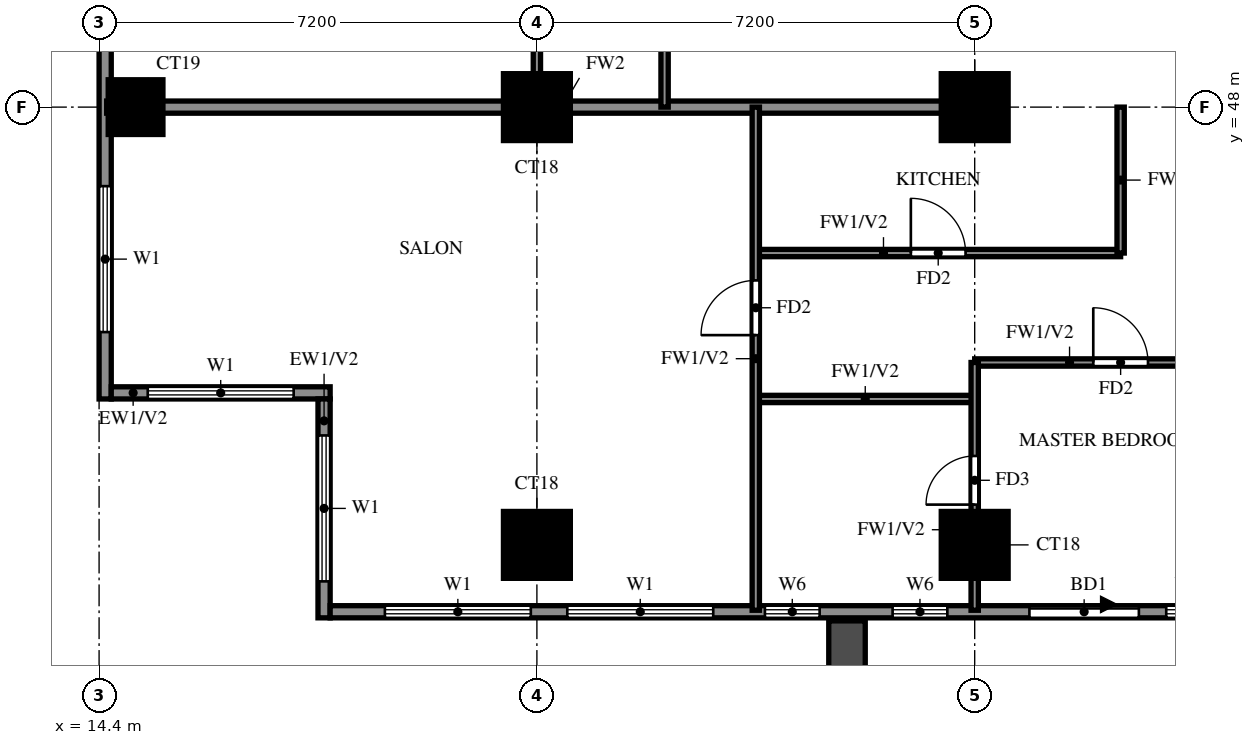
"""IFC4 building model, lengths in metres.
Left out: names, types, materials, properties, quantities, classifications, styles, units other than length and angle.
Written with IfcOpenShell. Run it as: python <this file> out.ifc"""

import sys

from ifc_helpers import new_model, si_unit, direction, frame, frame_2d, origin, origin_2d, place, context, subcontext, project, spatial, rectangle, extrude, source, transform, mapped, element, fill, save


model = new_model("IFC4")
c1 = context("Model", 3, precision=1e-05, world=origin(), true_north=direction((0.0, 1.0)))
c2 = subcontext(c1, "Body", "Model", "MODEL_VIEW")
j1 = project(units=[si_unit("LENGTHUNIT", "METRE"), si_unit("PLANEANGLEUNIT", "RADIAN")], contexts=[c1])
p1 = place(None, origin())
s1 = spatial("IfcSite", under=j1, at=p1, CompositionType="ELEMENT")
p2 = place(p1, origin())
s2 = spatial("IfcBuilding", under=s1, at=p2, CompositionType="ELEMENT")
p3 = place(p2, frame((0.0, 0.0, 123.5)))
s3 = spatial("IfcBuildingStorey", under=s2, at=p3, CompositionType="ELEMENT", Elevation=123.5)
m1 = source(origin(), c2, "Body", "SweptSolid", [
    extrude(rectangle(XDim=1.1, YDim=1.1, at=origin_2d()), origin(), (0.0, 0.0, 1.0), 3.2),
])
for number, where, z_axis, x_axis in (
    (1, (21.6, 40.8, 0.0), (0.0, 0.0, 1.0), (1.0, 0.0, 0.0)),
    (2, (28.8, 40.8, 0.0), (0.0, 0.0, 1.0), (1.0, 0.0, 0.0)),
):
    element("IfcColumn", number, at=place(p3, frame(where, z_axis=z_axis, x_axis=x_axis)), inside=s3, PredefinedType="COLUMN", context=c2, shape_type="MappedRepresentation", body=[
        mapped(m1, transform((0.0, 0.0, 0.0))),
    ])
m2 = source(origin(), c2, "Body", "SweptSolid", [
    extrude(rectangle(XDim=0.9, YDim=0.9, at=origin_2d()), origin(), (0.0, 0.0, 1.0), 3.2),
])
p4 = place(p3, frame((15.0, 48.0, 0.0), z_axis=(0.0, 0.0, 1.0), x_axis=(1.0, 0.0, 0.0)))
e3 = element("IfcColumn", 3, at=p4, inside=s3, PredefinedType="COLUMN", context=c2, shape_type="MappedRepresentation", body=[
    mapped(m2, transform((0.0, 0.0, 0.0))),
])
for number, where, z_axis, x_axis in (
    (4, (21.6, 48.0, 0.0), (0.0, 0.0, 1.0), (1.0, 0.0, 0.0)),
    (5, (28.8, 48.0, 0.0), (0.0, 0.0, 1.0), (1.0, 0.0, 0.0)),
):
    element("IfcColumn", number, at=place(p3, frame(where, z_axis=z_axis, x_axis=x_axis)), inside=s3, PredefinedType="COLUMN", context=c2, shape_type="MappedRepresentation", body=[
        mapped(m1, transform((0.0, 0.0, 0.0))),
    ])
p5 = place(p3, frame((14.5, 76.6, 0.0), z_axis=(0.0, 0.0, 1.0), x_axis=(0.0, -1.0, 0.0)))
e6 = element("IfcWall", 6, at=p5, inside=s3, PredefinedType="SOLIDWALL", context=c2, shape_type="SweptSolid", body=[
    extrude(rectangle(XDim=33.4, YDim=0.2, at=frame_2d((16.7, 0.0))), origin(), (0.0, 0.0, 1.0), 3.2),
])
p6 = place(p5, frame((4.3, 0.0, 0.0)))
e7 = element("IfcOpeningElement", 7, at=p6, cuts=e6, PredefinedType="OPENING", context=c2, shape_type="SweptSolid", body=[
    extrude(rectangle(XDim=1.8, YDim=2.4, at=frame_2d((0.9, 1.2))), frame((0.0, 0.11, 0.0), z_axis=(0.0, -1.0, 0.0), x_axis=(1.0, 0.0, 0.0)), (0.0, 0.0, 1.0), 0.22),
])
p7 = place(p5, frame((18.7, 0.0, 0.0)))
e8 = element("IfcOpeningElement", 8, at=p7, cuts=e6, PredefinedType="OPENING", context=c2, shape_type="SweptSolid", body=[
    extrude(rectangle(XDim=1.8, YDim=2.4, at=frame_2d((0.9, 1.2))), frame((0.0, 0.11, 0.0), z_axis=(0.0, -1.0, 0.0), x_axis=(1.0, 0.0, 0.0)), (0.0, 0.0, 1.0), 0.22),
])
p8 = place(p5, frame((29.9, 0.0, 0.6)))
e9 = element("IfcOpeningElement", 9, at=p8, cuts=e6, PredefinedType="OPENING", context=c2, shape_type="SweptSolid", body=[
    extrude(rectangle(XDim=2.4, YDim=2.4, at=frame_2d((1.2, 1.2))), frame((0.0, 0.11, 0.0), z_axis=(0.0, -1.0, 0.0), x_axis=(1.0, 0.0, 0.0)), (0.0, 0.0, 1.0), 0.22),
])
p9 = place(p5, frame((22.05, 0.0, 0.6)))
e10 = element("IfcOpeningElement", 10, at=p9, cuts=e6, PredefinedType="OPENING", context=c2, shape_type="SweptSolid", body=[
    extrude(rectangle(XDim=0.9, YDim=2.4, at=frame_2d((0.45, 1.2))), frame((0.0, 0.11, 0.0), z_axis=(0.0, -1.0, 0.0), x_axis=(1.0, 0.0, 0.0)), (0.0, 0.0, 1.0), 0.22),
])
p10 = place(p5, frame((24.8, 0.0, 0.6)))
e11 = element("IfcOpeningElement", 11, at=p10, cuts=e6, PredefinedType="OPENING", context=c2, shape_type="SweptSolid", body=[
    extrude(rectangle(XDim=2.4, YDim=2.4, at=frame_2d((1.2, 1.2))), frame((0.0, 0.11, 0.0), z_axis=(0.0, -1.0, 0.0), x_axis=(1.0, 0.0, 0.0)), (0.0, 0.0, 1.0), 0.22),
])
p11 = place(p5, frame((15.0, 0.0, 0.6)))
e12 = element("IfcOpeningElement", 12, at=p11, cuts=e6, PredefinedType="OPENING", context=c2, shape_type="SweptSolid", body=[
    extrude(rectangle(XDim=1.2, YDim=2.4, at=frame_2d((0.6, 1.2))), frame((0.0, 0.11, 0.0), z_axis=(0.0, -1.0, 0.0), x_axis=(1.0, 0.0, 0.0)), (0.0, 0.0, 1.0), 0.22),
])
p12 = place(p5, frame((11.75, 0.0, 1.5)))
e13 = element("IfcOpeningElement", 13, at=p12, cuts=e6, PredefinedType="OPENING", context=c2, shape_type="SweptSolid", body=[
    extrude(rectangle(XDim=0.9, YDim=0.9, at=frame_2d((0.45, 0.45))), frame((0.0, 0.11, 0.0), z_axis=(0.0, -1.0, 0.0), x_axis=(1.0, 0.0, 0.0)), (0.0, 0.0, 1.0), 0.22),
])
p13 = place(p5, frame((7.5, 0.0, 0.6)))
e14 = element("IfcOpeningElement", 14, at=p13, cuts=e6, PredefinedType="OPENING", context=c2, shape_type="SweptSolid", body=[
    extrude(rectangle(XDim=1.2, YDim=2.4, at=frame_2d((0.6, 1.2))), frame((0.0, 0.11, 0.0), z_axis=(0.0, -1.0, 0.0), x_axis=(1.0, 0.0, 0.0)), (0.0, 0.0, 1.0), 0.22),
])
p14 = place(p5, frame((9.55, 0.0, 0.6)))
e15 = element("IfcOpeningElement", 15, at=p14, cuts=e6, PredefinedType="OPENING", context=c2, shape_type="SweptSolid", body=[
    extrude(rectangle(XDim=0.9, YDim=2.4, at=frame_2d((0.45, 1.2))), frame((0.0, 0.11, 0.0), z_axis=(0.0, -1.0, 0.0), x_axis=(1.0, 0.0, 0.0)), (0.0, 0.0, 1.0), 0.22),
])
p15 = place(p5, frame((0.6, 0.0, 0.6)))
e16 = element("IfcOpeningElement", 16, at=p15, cuts=e6, PredefinedType="OPENING", context=c2, shape_type="SweptSolid", body=[
    extrude(rectangle(XDim=1.2, YDim=2.4, at=frame_2d((0.6, 1.2))), frame((0.0, 0.11, 0.0), z_axis=(0.0, -1.0, 0.0), x_axis=(1.0, 0.0, 0.0)), (0.0, 0.0, 1.0), 0.22),
])
p16 = place(p3, frame((14.6, 43.3, 0.0), z_axis=(0.0, 0.0, 1.0), x_axis=(1.0, 0.0, 0.0)))
e17 = element("IfcWall", 17, at=p16, inside=s3, PredefinedType="SOLIDWALL", context=c2, shape_type="SweptSolid", body=[
    extrude(rectangle(XDim=3.6, YDim=0.2, at=frame_2d((1.8, 0.0))), origin(), (0.0, 0.0, 1.0), 3.2),
])
p17 = place(p16, frame((0.6, 0.0, 0.6)))
e18 = element("IfcOpeningElement", 18, at=p17, cuts=e17, PredefinedType="OPENING", context=c2, shape_type="SweptSolid", body=[
    extrude(rectangle(XDim=2.4, YDim=2.4, at=frame_2d((1.2, 1.2))), frame((0.0, 0.11, 0.0), z_axis=(0.0, -1.0, 0.0), x_axis=(1.0, 0.0, 0.0)), (0.0, 0.0, 1.0), 0.22),
])
p18 = place(p3, frame((18.1, 43.2, 0.0), z_axis=(0.0, 0.0, 1.0), x_axis=(0.0, -1.0, 0.0)))
e19 = element("IfcWall", 19, at=p18, inside=s3, PredefinedType="SOLIDWALL", context=c2, shape_type="SweptSolid", body=[
    extrude(rectangle(XDim=3.6, YDim=0.2, at=frame_2d((1.8, 0.0))), origin(), (0.0, 0.0, 1.0), 3.2),
])
p19 = place(p18, frame((0.6, 0.0, 0.6)))
e20 = element("IfcOpeningElement", 20, at=p19, cuts=e19, PredefinedType="OPENING", context=c2, shape_type="SweptSolid", body=[
    extrude(rectangle(XDim=2.4, YDim=2.4, at=frame_2d((1.2, 1.2))), frame((0.0, 0.11, 0.0), z_axis=(0.0, -1.0, 0.0), x_axis=(1.0, 0.0, 0.0)), (0.0, 0.0, 1.0), 0.22),
])
p20 = place(p3, frame((18.2, 39.7, 0.0), z_axis=(0.0, 0.0, 1.0), x_axis=(1.0, 0.0, 0.0)))
e21 = element("IfcWall", 21, at=p20, inside=s3, PredefinedType="SOLIDWALL", context=c2, shape_type="SweptSolid", body=[
    extrude(rectangle(XDim=23.8, YDim=0.2, at=frame_2d((11.9, 0.0))), origin(), (0.0, 0.0, 1.0), 3.2),
])
p21 = place(p20, frame((11.5, 0.0, 0.0)))
e22 = element("IfcOpeningElement", 22, at=p21, cuts=e21, PredefinedType="OPENING", context=c2, shape_type="SweptSolid", body=[
    extrude(rectangle(XDim=1.8, YDim=2.4, at=frame_2d((0.9, 1.2))), frame((0.0, 0.11, 0.0), z_axis=(0.0, -1.0, 0.0), x_axis=(1.0, 0.0, 0.0)), (0.0, 0.0, 1.0), 0.22),
])
p22 = place(p20, frame((0.9, 0.0, 0.6)))
e23 = element("IfcOpeningElement", 23, at=p22, cuts=e21, PredefinedType="OPENING", context=c2, shape_type="SweptSolid", body=[
    extrude(rectangle(XDim=2.4, YDim=2.4, at=frame_2d((1.2, 1.2))), frame((0.0, 0.11, 0.0), z_axis=(0.0, -1.0, 0.0), x_axis=(1.0, 0.0, 0.0)), (0.0, 0.0, 1.0), 0.22),
])
p23 = place(p20, frame((3.9, 0.0, 0.6)))
e24 = element("IfcOpeningElement", 24, at=p23, cuts=e21, PredefinedType="OPENING", context=c2, shape_type="SweptSolid", body=[
    extrude(rectangle(XDim=2.4, YDim=2.4, at=frame_2d((1.2, 1.2))), frame((0.0, 0.11, 0.0), z_axis=(0.0, -1.0, 0.0), x_axis=(1.0, 0.0, 0.0)), (0.0, 0.0, 1.0), 0.22),
])
p24 = place(p20, frame((13.75, 0.0, 0.6)))
e25 = element("IfcOpeningElement", 25, at=p24, cuts=e21, PredefinedType="OPENING", context=c2, shape_type="SweptSolid", body=[
    extrude(rectangle(XDim=0.9, YDim=2.4, at=frame_2d((0.45, 1.2))), frame((0.0, 0.11, 0.0), z_axis=(0.0, -1.0, 0.0), x_axis=(1.0, 0.0, 0.0)), (0.0, 0.0, 1.0), 0.22),
])
p25 = place(p20, frame((7.15, 0.0, 1.5)))
e26 = element("IfcOpeningElement", 26, at=p25, cuts=e21, PredefinedType="OPENING", context=c2, shape_type="SweptSolid", body=[
    extrude(rectangle(XDim=0.9, YDim=0.9, at=frame_2d((0.45, 0.45))), frame((0.0, 0.11, 0.0), z_axis=(0.0, -1.0, 0.0), x_axis=(1.0, 0.0, 0.0)), (0.0, 0.0, 1.0), 0.22),
])
p26 = place(p20, frame((9.25, 0.0, 1.5)))
e27 = element("IfcOpeningElement", 27, at=p26, cuts=e21, PredefinedType="OPENING", context=c2, shape_type="SweptSolid", body=[
    extrude(rectangle(XDim=0.9, YDim=0.9, at=frame_2d((0.45, 0.45))), frame((0.0, 0.11, 0.0), z_axis=(0.0, -1.0, 0.0), x_axis=(1.0, 0.0, 0.0)), (0.0, 0.0, 1.0), 0.22),
])
p27 = place(p3, frame((26.7, 39.55, 0.0), z_axis=(0.0, 0.0, 1.0), x_axis=(0.0, -1.0, 0.0)))
e28 = element("IfcWall", 28, at=p27, inside=s3, PredefinedType="SOLIDWALL", context=c2, shape_type="SweptSolid", body=[
    extrude(rectangle(XDim=2.65, YDim=0.6, at=frame_2d((1.325, 0.0))), origin(), (0.0, 0.0, 1.0), 2.85),
])
p28 = place(p3, frame((14.525, 48.0, 0.0), z_axis=(0.0, 0.0, 1.0), x_axis=(1.0, 0.0, 0.0)))
e29 = element("IfcWall", 29, at=p28, inside=s3, PredefinedType="SOLIDWALL", context=c2, shape_type="SweptSolid", body=[
    extrude(rectangle(XDim=14.275, YDim=0.2, at=frame_2d((7.138, 0.0))), origin(), (0.0, 0.0, 1.0), 3.2),
])
p29 = place(p3, frame((25.2, 43.2, 0.0), z_axis=(0.0, 0.0, 1.0), x_axis=(1.0, 0.0, 0.0)))
e30 = element("IfcWall", 30, at=p29, inside=s3, PredefinedType="PARTITIONING", context=c2, shape_type="SweptSolid", body=[
    extrude(rectangle(XDim=3.6, YDim=0.12, at=frame_2d((1.8, 0.0))), origin(), (0.0, 0.0, 1.0), 3.2),
])
p30 = place(p3, frame((28.8, 43.8, 0.0), z_axis=(0.0, 0.0, 1.0), x_axis=(1.0, 0.0, 0.0)))
e31 = element("IfcWall", 31, at=p30, inside=s3, PredefinedType="PARTITIONING", context=c2, shape_type="SweptSolid", body=[
    extrude(rectangle(XDim=4.8, YDim=0.12, at=frame_2d((2.4, 0.0))), origin(), (0.0, 0.0, 1.0), 3.2),
])
p31 = place(p30, frame((1.95, 0.0, 0.0)))
e32 = element("IfcOpeningElement", 32, at=p31, cuts=e31, PredefinedType="OPENING", context=c2, shape_type="SweptSolid", body=[
    extrude(rectangle(XDim=0.9, YDim=2.1, at=frame_2d((0.45, 1.05))), frame((0.0, 0.07, 0.0), z_axis=(0.0, -1.0, 0.0), x_axis=(1.0, 0.0, 0.0)), (0.0, 0.0, 1.0), 0.14),
])
p32 = place(p3, frame((25.2, 45.6, 0.0), z_axis=(0.0, 0.0, 1.0), x_axis=(1.0, 0.0, 0.0)))
e33 = element("IfcWall", 33, at=p32, inside=s3, PredefinedType="PARTITIONING", context=c2, shape_type="SweptSolid", body=[
    extrude(rectangle(XDim=6.0, YDim=0.12, at=frame_2d((3.0, 0.0))), origin(), (0.0, 0.0, 1.0), 3.2),
])
p33 = place(p32, frame((2.55, 0.0, 0.0)))
e34 = element("IfcOpeningElement", 34, at=p33, cuts=e33, PredefinedType="OPENING", context=c2, shape_type="SweptSolid", body=[
    extrude(rectangle(XDim=0.9, YDim=2.1, at=frame_2d((0.45, 1.05))), frame((0.0, 0.07, 0.0), z_axis=(0.0, -1.0, 0.0), x_axis=(1.0, 0.0, 0.0)), (0.0, 0.0, 1.0), 0.14),
])
p34 = place(p3, frame((21.6, 48.0, 0.0), z_axis=(0.0, 0.0, 1.0), x_axis=(0.0, 1.0, 0.0)))
e35 = element("IfcWall", 35, at=p34, inside=s3, PredefinedType="PARTITIONING", context=c2, shape_type="SweptSolid", body=[
    extrude(rectangle(XDim=14.4, YDim=0.12, at=frame_2d((7.2, 0.0))), origin(), (0.0, 0.0, 1.0), 3.2),
])
p35 = place(p34, frame((2.85, 0.0, 0.0)))
e36 = element("IfcOpeningElement", 36, at=p35, cuts=e35, PredefinedType="OPENING", context=c2, shape_type="SweptSolid", body=[
    extrude(rectangle(XDim=1.5, YDim=2.1, at=frame_2d((0.75, 1.05))), frame((0.0, 0.07, 0.0), z_axis=(0.0, -1.0, 0.0), x_axis=(1.0, 0.0, 0.0)), (0.0, 0.0, 1.0), 0.14),
])
p36 = place(p34, frame((8.55, 0.0, 0.0)))
e37 = element("IfcOpeningElement", 37, at=p36, cuts=e35, PredefinedType="OPENING", context=c2, shape_type="SweptSolid", body=[
    extrude(rectangle(XDim=0.9, YDim=2.1, at=frame_2d((0.45, 1.05))), frame((0.0, 0.07, 0.0), z_axis=(0.0, -1.0, 0.0), x_axis=(1.0, 0.0, 0.0)), (0.0, 0.0, 1.0), 0.14),
])
p37 = place(p34, frame((12.15, 0.0, 0.0)))
e38 = element("IfcOpeningElement", 38, at=p37, cuts=e35, PredefinedType="OPENING", context=c2, shape_type="SweptSolid", body=[
    extrude(rectangle(XDim=0.9, YDim=2.1, at=frame_2d((0.45, 1.05))), frame((0.0, 0.07, 0.0), z_axis=(0.0, -1.0, 0.0), x_axis=(1.0, 0.0, 0.0)), (0.0, 0.0, 1.0), 0.14),
])
p38 = place(p3, frame((23.7, 48.0, 0.0), z_axis=(0.0, 0.0, 1.0), x_axis=(0.0, 1.0, 0.0)))
e39 = element("IfcWall", 39, at=p38, inside=s3, PredefinedType="PARTITIONING", context=c2, shape_type="SweptSolid", body=[
    extrude(rectangle(XDim=2.4, YDim=0.12, at=frame_2d((1.2, 0.0))), origin(), (0.0, 0.0, 1.0), 3.2),
])
p39 = place(p3, frame((25.2, 39.725, 0.0), z_axis=(0.0, 0.0, 1.0), x_axis=(0.0, 1.0, 0.0)))
e40 = element("IfcWall", 40, at=p39, inside=s3, PredefinedType="PARTITIONING", context=c2, shape_type="SweptSolid", body=[
    extrude(rectangle(XDim=8.275, YDim=0.12, at=frame_2d((4.137, 0.0))), origin(), (0.0, 0.0, 1.0), 3.2),
])
p40 = place(p39, frame((4.525, 0.0, 0.0)))
e41 = element("IfcOpeningElement", 41, at=p40, cuts=e40, PredefinedType="OPENING", context=c2, shape_type="SweptSolid", body=[
    extrude(rectangle(XDim=0.9, YDim=2.1, at=frame_2d((0.45, 1.05))), frame((0.0, 0.07, 0.0), z_axis=(0.0, -1.0, 0.0), x_axis=(1.0, 0.0, 0.0)), (0.0, 0.0, 1.0), 0.14),
])
p41 = place(p3, frame((28.8, 39.725, 0.0), z_axis=(0.0, 0.0, 1.0), x_axis=(0.0, 1.0, 0.0)))
e42 = element("IfcWall", 42, at=p41, inside=s3, PredefinedType="PARTITIONING", context=c2, shape_type="SweptSolid", body=[
    extrude(rectangle(XDim=4.075, YDim=0.12, at=frame_2d((2.038, 0.0))), origin(), (0.0, 0.0, 1.0), 3.2),
])
p42 = place(p41, frame((1.738, 0.0, 0.0)))
e43 = element("IfcOpeningElement", 43, at=p42, cuts=e42, PredefinedType="OPENING", context=c2, shape_type="SweptSolid", body=[
    extrude(rectangle(XDim=0.8, YDim=2.1, at=frame_2d((0.4, 1.05))), frame((0.0, 0.07, 0.0), z_axis=(0.0, -1.0, 0.0), x_axis=(1.0, 0.0, 0.0)), (0.0, 0.0, 1.0), 0.14),
])
p43 = place(p3, frame((31.2, 45.6, 0.0), z_axis=(0.0, 0.0, 1.0), x_axis=(0.0, 1.0, 0.0)))
e44 = element("IfcWall", 44, at=p43, inside=s3, PredefinedType="PARTITIONING", context=c2, shape_type="SweptSolid", body=[
    extrude(rectangle(XDim=2.4, YDim=0.12, at=frame_2d((1.2, 0.0))), origin(), (0.0, 0.0, 1.0), 3.2),
])
p44 = place(p8, origin())
e45 = element("IfcWindow", 45, at=p44, inside=s3, PartitioningType="DOUBLE_PANEL_VERTICAL", PredefinedType="WINDOW", context=c2, shape_type="SweptSolid", body=[
    extrude(rectangle(XDim=2.4, YDim=2.4, at=frame_2d((1.2, 1.2))), frame((0.0, 0.03, 0.0), z_axis=(0.0, -1.0, 0.0), x_axis=(1.0, 0.0, 0.0)), (0.0, 0.0, 1.0), 0.06),
])
fill(e9, e45)
p45 = place(p17, origin())
e46 = element("IfcWindow", 46, at=p45, inside=s3, PartitioningType="DOUBLE_PANEL_VERTICAL", PredefinedType="WINDOW", context=c2, shape_type="SweptSolid", body=[
    extrude(rectangle(XDim=2.4, YDim=2.4, at=frame_2d((1.2, 1.2))), frame((0.0, 0.03, 0.0), z_axis=(0.0, -1.0, 0.0), x_axis=(1.0, 0.0, 0.0)), (0.0, 0.0, 1.0), 0.06),
])
fill(e18, e46)
p46 = place(p19, origin())
e47 = element("IfcWindow", 47, at=p46, inside=s3, PartitioningType="DOUBLE_PANEL_VERTICAL", PredefinedType="WINDOW", context=c2, shape_type="SweptSolid", body=[
    extrude(rectangle(XDim=2.4, YDim=2.4, at=frame_2d((1.2, 1.2))), frame((0.0, 0.03, 0.0), z_axis=(0.0, -1.0, 0.0), x_axis=(1.0, 0.0, 0.0)), (0.0, 0.0, 1.0), 0.06),
])
fill(e20, e47)
p47 = place(p21, origin())
e48 = element("IfcDoor", 48, at=p47, inside=s3, OperationType="DOUBLE_DOOR_SLIDING", PredefinedType="DOOR", context=c2, shape_type="SweptSolid", body=[
    extrude(rectangle(XDim=1.8, YDim=2.4, at=frame_2d((0.9, 1.2))), frame((0.0, 0.025, 0.0), z_axis=(0.0, -1.0, 0.0), x_axis=(1.0, 0.0, 0.0)), (0.0, 0.0, 1.0), 0.05),
])
fill(e22, e48)
p48 = place(p22, origin())
e49 = element("IfcWindow", 49, at=p48, inside=s3, PartitioningType="DOUBLE_PANEL_VERTICAL", PredefinedType="WINDOW", context=c2, shape_type="SweptSolid", body=[
    extrude(rectangle(XDim=2.4, YDim=2.4, at=frame_2d((1.2, 1.2))), frame((0.0, 0.03, 0.0), z_axis=(0.0, -1.0, 0.0), x_axis=(1.0, 0.0, 0.0)), (0.0, 0.0, 1.0), 0.06),
])
fill(e23, e49)
p49 = place(p23, origin())
e50 = element("IfcWindow", 50, at=p49, inside=s3, PartitioningType="DOUBLE_PANEL_VERTICAL", PredefinedType="WINDOW", context=c2, shape_type="SweptSolid", body=[
    extrude(rectangle(XDim=2.4, YDim=2.4, at=frame_2d((1.2, 1.2))), frame((0.0, 0.03, 0.0), z_axis=(0.0, -1.0, 0.0), x_axis=(1.0, 0.0, 0.0)), (0.0, 0.0, 1.0), 0.06),
])
fill(e24, e50)
p50 = place(p24, origin())
e51 = element("IfcWindow", 51, at=p50, inside=s3, PartitioningType="SINGLE_PANEL", PredefinedType="WINDOW", context=c2, shape_type="SweptSolid", body=[
    extrude(rectangle(XDim=0.9, YDim=2.4, at=frame_2d((0.45, 1.2))), frame((0.0, 0.03, 0.0), z_axis=(0.0, -1.0, 0.0), x_axis=(1.0, 0.0, 0.0)), (0.0, 0.0, 1.0), 0.06),
])
fill(e25, e51)
p51 = place(p25, origin())
e52 = element("IfcWindow", 52, at=p51, inside=s3, PartitioningType="SINGLE_PANEL", PredefinedType="WINDOW", context=c2, shape_type="SweptSolid", body=[
    extrude(rectangle(XDim=0.9, YDim=0.9, at=frame_2d((0.45, 0.45))), frame((0.0, 0.03, 0.0), z_axis=(0.0, -1.0, 0.0), x_axis=(1.0, 0.0, 0.0)), (0.0, 0.0, 1.0), 0.06),
])
fill(e26, e52)
p52 = place(p26, origin())
e53 = element("IfcWindow", 53, at=p52, inside=s3, PartitioningType="SINGLE_PANEL", PredefinedType="WINDOW", context=c2, shape_type="SweptSolid", body=[
    extrude(rectangle(XDim=0.9, YDim=0.9, at=frame_2d((0.45, 0.45))), frame((0.0, 0.03, 0.0), z_axis=(0.0, -1.0, 0.0), x_axis=(1.0, 0.0, 0.0)), (0.0, 0.0, 1.0), 0.06),
])
fill(e27, e53)
p53 = place(p40, origin())
e54 = element("IfcDoor", 54, at=p53, inside=s3, OperationType="SINGLE_SWING_RIGHT", PredefinedType="DOOR", context=c2, shape_type="SweptSolid", body=[
    extrude(rectangle(XDim=0.9, YDim=2.1, at=frame_2d((0.45, 1.05))), frame((0.0, 0.025, 0.0), z_axis=(0.0, -1.0, 0.0), x_axis=(1.0, 0.0, 0.0)), (0.0, 0.0, 1.0), 0.05),
])
fill(e41, e54)
p54 = place(p31, origin())
e55 = element("IfcDoor", 55, at=p54, inside=s3, OperationType="SINGLE_SWING_LEFT", PredefinedType="DOOR", context=c2, shape_type="SweptSolid", body=[
    extrude(rectangle(XDim=0.9, YDim=2.1, at=frame_2d((0.45, 1.05))), frame((0.0, 0.025, 0.0), z_axis=(0.0, -1.0, 0.0), x_axis=(1.0, 0.0, 0.0)), (0.0, 0.0, 1.0), 0.05),
])
fill(e32, e55)
p55 = place(p42, origin())
e56 = element("IfcDoor", 56, at=p55, inside=s3, OperationType="SINGLE_SWING_RIGHT", PredefinedType="DOOR", context=c2, shape_type="SweptSolid", body=[
    extrude(rectangle(XDim=0.8, YDim=2.1, at=frame_2d((0.4, 1.05))), frame((0.0, 0.025, 0.0), z_axis=(0.0, -1.0, 0.0), x_axis=(1.0, 0.0, 0.0)), (0.0, 0.0, 1.0), 0.05),
])
fill(e43, e56)
p56 = place(p33, origin())
e57 = element("IfcDoor", 57, at=p56, inside=s3, OperationType="SINGLE_SWING_RIGHT", PredefinedType="DOOR", context=c2, shape_type="SweptSolid", body=[
    extrude(rectangle(XDim=0.9, YDim=2.1, at=frame_2d((0.45, 1.05))), frame((0.0, 0.025, 0.0), z_axis=(0.0, -1.0, 0.0), x_axis=(1.0, 0.0, 0.0)), (0.0, 0.0, 1.0), 0.05),
])
fill(e34, e57)
save(model, sys.argv[1])
